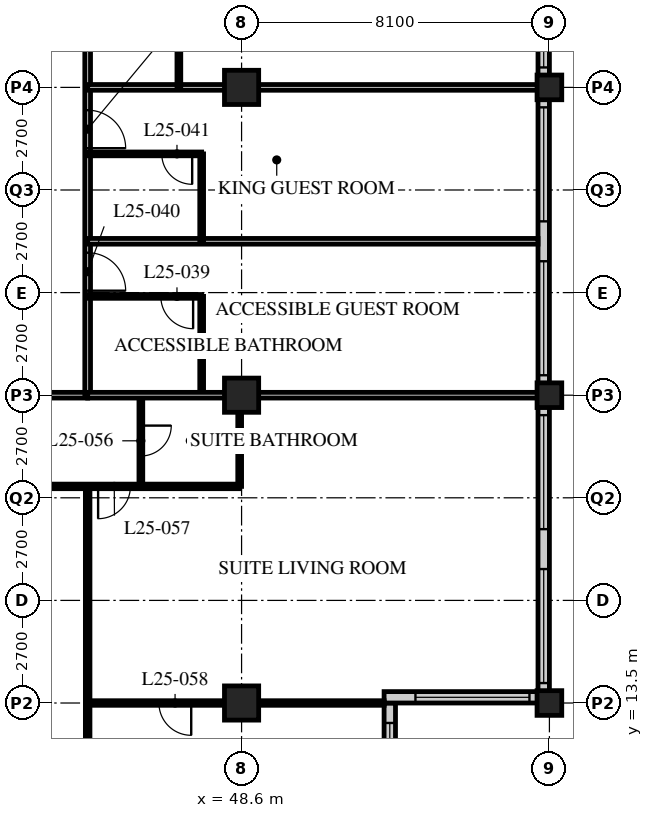
"""IFC4 building model, lengths in metres.
Left out: names, types, materials, properties, quantities, classifications, styles, units other than length and angle.
Written with IfcOpenShell. Run it as: python <this file> out.ifc"""

import sys

from ifc_helpers import new_model, si_unit, direction, frame, frame_2d, origin, origin_2d, place, context, subcontext, project, spatial, rectangle, hollow_rectangle, extrude, element, fill, save


model = new_model("IFC4")
c1 = context("Model", 3, precision=1e-05, world=origin(), true_north=direction((0.0, 1.0)))
c2 = subcontext(c1, "Body", "Model", "MODEL_VIEW")
j1 = project(units=[si_unit("LENGTHUNIT", "METRE"), si_unit("PLANEANGLEUNIT", "RADIAN")], contexts=[c1])
p1 = place(None, origin())
s1 = spatial("IfcSite", under=j1, at=p1, CompositionType="ELEMENT")
p2 = place(p1, origin())
s2 = spatial("IfcBuilding", under=s1, at=p2, CompositionType="ELEMENT")
p3 = place(p2, frame((0.0, 0.0, 103.4)))
s3 = spatial("IfcBuildingStorey", under=s2, at=p3, CompositionType="ELEMENT", Elevation=103.4)
for number, where, z_axis, x_axis in (
    (1, (48.6, 13.5, 0.0), (0.0, 0.0, 1.0), (1.0, 0.0, 0.0)),
    (2, (48.6, 21.6, 0.0), (0.0, 0.0, 1.0), (1.0, 0.0, 0.0)),
    (3, (48.6, 29.7, 0.0), (0.0, 0.0, 1.0), (1.0, 0.0, 0.0)),
):
    element("IfcColumn", number, at=place(p3, frame(where, z_axis=z_axis, x_axis=x_axis)), inside=s3, PredefinedType="COLUMN", context=c2, shape_type="SweptSolid", body=[
        extrude(hollow_rectangle(XDim=0.9, YDim=0.9, WallThickness=0.1, at=origin_2d()), origin(), (0.0, 0.0, 1.0), 3.4),
    ])
for number, where, z_axis, x_axis in (
    (4, (56.7, 13.5, 0.0), (0.0, 0.0, 1.0), (1.0, 0.0, 0.0)),
    (5, (56.7, 21.6, 0.0), (0.0, 0.0, 1.0), (1.0, 0.0, 0.0)),
    (6, (56.7, 29.7, 0.0), (0.0, 0.0, 1.0), (1.0, 0.0, 0.0)),
):
    element("IfcColumn", number, at=place(p3, frame(where, z_axis=z_axis, x_axis=x_axis)), inside=s3, PredefinedType="COLUMN", context=c2, shape_type="SweptSolid", body=[
        extrude(hollow_rectangle(XDim=0.65, YDim=0.65, WallThickness=0.055, at=origin_2d()), origin(), (0.0, 0.0, 1.0), 3.4),
    ])
p4 = place(p3, frame((52.5, 9.75, 0.0), z_axis=(0.0, 0.0, 1.0), x_axis=(0.0, 1.0, 0.0)))
e7 = element("IfcWall", 7, at=p4, inside=s3, PredefinedType="SOLIDWALL", context=c2, shape_type="SweptSolid", body=[
    extrude(rectangle(XDim=3.75, YDim=0.3, at=frame_2d((1.875, 0.0))), origin(), (0.0, 0.0, 1.0), 3.19),
])
p5 = place(p4, frame((0.225, 0.0, 0.9)))
e8 = element("IfcOpeningElement", 8, at=p5, cuts=e7, PredefinedType="OPENING", context=c2, shape_type="SweptSolid", body=[
    extrude(rectangle(XDim=3.0, YDim=1.5, at=frame_2d((1.5, 0.75))), frame((0.0, 0.16, 0.0), z_axis=(0.0, -1.0, 0.0), x_axis=(1.0, 0.0, 0.0)), (0.0, 0.0, 1.0), 0.32),
])
p6 = place(p3, frame((52.35, 13.65, 0.0), z_axis=(0.0, 0.0, 1.0), x_axis=(1.0, 0.0, 0.0)))
e9 = element("IfcWall", 9, at=p6, inside=s3, PredefinedType="SOLIDWALL", context=c2, shape_type="SweptSolid", body=[
    extrude(rectangle(XDim=4.35, YDim=0.3, at=frame_2d((2.175, 0.0))), origin(), (0.0, 0.0, 1.0), 3.19),
])
p7 = place(p6, frame((0.825, 0.0, 0.9)))
e10 = element("IfcOpeningElement", 10, at=p7, cuts=e9, PredefinedType="OPENING", context=c2, shape_type="SweptSolid", body=[
    extrude(rectangle(XDim=3.0, YDim=1.5, at=frame_2d((1.5, 0.75))), frame((0.0, 0.16, 0.0), z_axis=(0.0, -1.0, 0.0), x_axis=(1.0, 0.0, 0.0)), (0.0, 0.0, 1.0), 0.32),
])
p8 = place(p3, frame((56.55, 13.8, 0.0), z_axis=(0.0, 0.0, 1.0), x_axis=(0.0, 1.0, 0.0)))
e11 = element("IfcWall", 11, at=p8, inside=s3, PredefinedType="SOLIDWALL", context=c2, shape_type="SweptSolid", body=[
    extrude(rectangle(XDim=32.1, YDim=0.3, at=frame_2d((16.05, 0.0))), origin(), (0.0, 0.0, 1.0), 3.19),
])
p9 = place(p8, frame((0.225, 0.0, 0.9)))
e12 = element("IfcOpeningElement", 12, at=p9, cuts=e11, PredefinedType="OPENING", context=c2, shape_type="SweptSolid", body=[
    extrude(rectangle(XDim=3.0, YDim=2.0, at=frame_2d((1.5, 1.0))), frame((0.0, 0.16, 0.0), z_axis=(0.0, -1.0, 0.0), x_axis=(1.0, 0.0, 0.0)), (0.0, 0.0, 1.0), 0.32),
])
p10 = place(p8, frame((4.275, 0.0, 0.9)))
e13 = element("IfcOpeningElement", 13, at=p10, cuts=e11, PredefinedType="OPENING", context=c2, shape_type="SweptSolid", body=[
    extrude(rectangle(XDim=3.0, YDim=2.0, at=frame_2d((1.5, 1.0))), frame((0.0, 0.16, 0.0), z_axis=(0.0, -1.0, 0.0), x_axis=(1.0, 0.0, 0.0)), (0.0, 0.0, 1.0), 0.32),
])
p11 = place(p8, frame((8.325, 0.0, 0.9)))
e14 = element("IfcOpeningElement", 14, at=p11, cuts=e11, PredefinedType="OPENING", context=c2, shape_type="SweptSolid", body=[
    extrude(rectangle(XDim=3.0, YDim=2.0, at=frame_2d((1.5, 1.0))), frame((0.0, 0.16, 0.0), z_axis=(0.0, -1.0, 0.0), x_axis=(1.0, 0.0, 0.0)), (0.0, 0.0, 1.0), 0.32),
])
p12 = place(p8, frame((12.375, 0.0, 0.9)))
e15 = element("IfcOpeningElement", 15, at=p12, cuts=e11, PredefinedType="OPENING", context=c2, shape_type="SweptSolid", body=[
    extrude(rectangle(XDim=3.0, YDim=2.0, at=frame_2d((1.5, 1.0))), frame((0.0, 0.16, 0.0), z_axis=(0.0, -1.0, 0.0), x_axis=(1.0, 0.0, 0.0)), (0.0, 0.0, 1.0), 0.32),
])
p13 = place(p8, frame((16.425, 0.0, 0.9)))
e16 = element("IfcOpeningElement", 16, at=p13, cuts=e11, PredefinedType="OPENING", context=c2, shape_type="SweptSolid", body=[
    extrude(rectangle(XDim=3.0, YDim=2.0, at=frame_2d((1.5, 1.0))), frame((0.0, 0.16, 0.0), z_axis=(0.0, -1.0, 0.0), x_axis=(1.0, 0.0, 0.0)), (0.0, 0.0, 1.0), 0.32),
])
p14 = place(p8, frame((20.475, 0.0, 0.9)))
e17 = element("IfcOpeningElement", 17, at=p14, cuts=e11, PredefinedType="OPENING", context=c2, shape_type="SweptSolid", body=[
    extrude(rectangle(XDim=3.0, YDim=2.0, at=frame_2d((1.5, 1.0))), frame((0.0, 0.16, 0.0), z_axis=(0.0, -1.0, 0.0), x_axis=(1.0, 0.0, 0.0)), (0.0, 0.0, 1.0), 0.32),
])
p15 = place(p8, frame((24.525, 0.0, 0.9)))
e18 = element("IfcOpeningElement", 18, at=p15, cuts=e11, PredefinedType="OPENING", context=c2, shape_type="SweptSolid", body=[
    extrude(rectangle(XDim=3.0, YDim=2.0, at=frame_2d((1.5, 1.0))), frame((0.0, 0.16, 0.0), z_axis=(0.0, -1.0, 0.0), x_axis=(1.0, 0.0, 0.0)), (0.0, 0.0, 1.0), 0.32),
])
p16 = place(p8, frame((28.575, 0.0, 0.9)))
e19 = element("IfcOpeningElement", 19, at=p16, cuts=e11, PredefinedType="OPENING", context=c2, shape_type="SweptSolid", body=[
    extrude(rectangle(XDim=3.0, YDim=2.0, at=frame_2d((1.5, 1.0))), frame((0.0, 0.16, 0.0), z_axis=(0.0, -1.0, 0.0), x_axis=(1.0, 0.0, 0.0)), (0.0, 0.0, 1.0), 0.32),
])
p17 = place(p3, frame((12.15, 21.6, 0.0), z_axis=(0.0, 0.0, 1.0), x_axis=(1.0, 0.0, 0.0)))
e20 = element("IfcWall", 20, at=p17, inside=s3, PredefinedType="PARTITIONING", context=c2, shape_type="SweptSolid", body=[
    extrude(rectangle(XDim=32.4, YDim=0.15, at=frame_2d((16.2, 0.0))), origin(), (0.0, 0.0, 1.0), 2.578),
])
p18 = place(p17, frame((5.95, 0.0, 0.0)))
e21 = element("IfcOpeningElement", 21, at=p18, cuts=e20, PredefinedType="OPENING", context=c2, shape_type="SweptSolid", body=[
    extrude(rectangle(XDim=1.0, YDim=2.1, at=frame_2d((0.5, 1.05))), frame((0.0, 0.085, 0.0), z_axis=(0.0, -1.0, 0.0), x_axis=(1.0, 0.0, 0.0)), (0.0, 0.0, 1.0), 0.17),
])
p19 = place(p17, frame((14.05, 0.0, 0.0)))
e22 = element("IfcOpeningElement", 22, at=p19, cuts=e20, PredefinedType="OPENING", context=c2, shape_type="SweptSolid", body=[
    extrude(rectangle(XDim=1.0, YDim=2.1, at=frame_2d((0.5, 1.05))), frame((0.0, 0.085, 0.0), z_axis=(0.0, -1.0, 0.0), x_axis=(1.0, 0.0, 0.0)), (0.0, 0.0, 1.0), 0.17),
])
p20 = place(p17, frame((22.15, 0.0, 0.0)))
e23 = element("IfcOpeningElement", 23, at=p20, cuts=e20, PredefinedType="OPENING", context=c2, shape_type="SweptSolid", body=[
    extrude(rectangle(XDim=1.0, YDim=2.1, at=frame_2d((0.5, 1.05))), frame((0.0, 0.085, 0.0), z_axis=(0.0, -1.0, 0.0), x_axis=(1.0, 0.0, 0.0)), (0.0, 0.0, 1.0), 0.17),
])
p21 = place(p17, frame((1.525, 0.0, 0.0)))
e24 = element("IfcOpeningElement", 24, at=p21, cuts=e20, PredefinedType="OPENING", context=c2, shape_type="SweptSolid", body=[
    extrude(rectangle(XDim=1.0, YDim=2.1, at=frame_2d((0.5, 1.05))), frame((0.0, 0.085, 0.0), z_axis=(0.0, -1.0, 0.0), x_axis=(1.0, 0.0, 0.0)), (0.0, 0.0, 1.0), 0.17),
])
p22 = place(p17, frame((29.875, 0.0, 0.0)))
e25 = element("IfcOpeningElement", 25, at=p22, cuts=e20, PredefinedType="OPENING", context=c2, shape_type="SweptSolid", body=[
    extrude(rectangle(XDim=1.0, YDim=2.1, at=frame_2d((0.5, 1.05))), frame((0.0, 0.085, 0.0), z_axis=(0.0, -1.0, 0.0), x_axis=(1.0, 0.0, 0.0)), (0.0, 0.0, 1.0), 0.17),
])
p23 = place(p3, frame((44.55, 21.6, 0.0), z_axis=(0.0, 0.0, 1.0), x_axis=(0.0, 1.0, 0.0)))
e26 = element("IfcWall", 26, at=p23, inside=s3, PredefinedType="PARTITIONING", context=c2, shape_type="SweptSolid", body=[
    extrude(rectangle(XDim=24.3, YDim=0.15, at=frame_2d((12.15, 0.0))), origin(), (0.0, 0.0, 1.0), 3.19),
])
p24 = place(p23, frame((2.75, 0.0, 0.0)))
e27 = element("IfcOpeningElement", 27, at=p24, cuts=e26, PredefinedType="OPENING", context=c2, shape_type="SweptSolid", body=[
    extrude(rectangle(XDim=1.0, YDim=2.1, at=frame_2d((0.5, 1.05))), frame((0.0, 0.085, 0.0), z_axis=(0.0, -1.0, 0.0), x_axis=(1.0, 0.0, 0.0)), (0.0, 0.0, 1.0), 0.17),
])
p25 = place(p23, frame((6.5, 0.0, 0.0)))
e28 = element("IfcOpeningElement", 28, at=p25, cuts=e26, PredefinedType="OPENING", context=c2, shape_type="SweptSolid", body=[
    extrude(rectangle(XDim=1.0, YDim=2.1, at=frame_2d((0.5, 1.05))), frame((0.0, 0.085, 0.0), z_axis=(0.0, -1.0, 0.0), x_axis=(1.0, 0.0, 0.0)), (0.0, 0.0, 1.0), 0.17),
])
p26 = place(p23, frame((13.55, 0.0, 0.0)))
e29 = element("IfcOpeningElement", 29, at=p26, cuts=e26, PredefinedType="OPENING", context=c2, shape_type="SweptSolid", body=[
    extrude(rectangle(XDim=1.0, YDim=2.1, at=frame_2d((0.5, 1.05))), frame((0.0, 0.085, 0.0), z_axis=(0.0, -1.0, 0.0), x_axis=(1.0, 0.0, 0.0)), (0.0, 0.0, 1.0), 0.17),
])
p27 = place(p23, frame((21.65, 0.0, 0.0)))
e30 = element("IfcOpeningElement", 30, at=p27, cuts=e26, PredefinedType="OPENING", context=c2, shape_type="SweptSolid", body=[
    extrude(rectangle(XDim=1.0, YDim=2.1, at=frame_2d((0.5, 1.05))), frame((0.0, 0.085, 0.0), z_axis=(0.0, -1.0, 0.0), x_axis=(1.0, 0.0, 0.0)), (0.0, 0.0, 1.0), 0.17),
])
p28 = place(p3, frame((47.55, 21.6, 0.0), z_axis=(0.0, 0.0, 1.0), x_axis=(0.0, 1.0, 0.0)))
e31 = element("IfcWall", 31, at=p28, inside=s3, PredefinedType="PARTITIONING", context=c2, shape_type="SweptSolid", body=[
    extrude(rectangle(XDim=2.6, YDim=0.1, at=frame_2d((1.3, 0.0))), origin(), (0.0, 0.0, 1.0), 3.19),
])
p29 = place(p3, frame((44.55, 24.2, 0.0), z_axis=(0.0, 0.0, 1.0), x_axis=(1.0, 0.0, 0.0)))
e32 = element("IfcWall", 32, at=p29, inside=s3, PredefinedType="PARTITIONING", context=c2, shape_type="SweptSolid", body=[
    extrude(rectangle(XDim=3.0, YDim=0.1, at=frame_2d((1.5, 0.0))), origin(), (0.0, 0.0, 1.0), 3.19),
])
p30 = place(p29, frame((1.925, 0.0, 0.0)))
e33 = element("IfcOpeningElement", 33, at=p30, cuts=e32, PredefinedType="OPENING", context=c2, shape_type="SweptSolid", body=[
    extrude(rectangle(XDim=0.85, YDim=2.1, at=frame_2d((0.425, 1.05))), frame((0.0, 0.06, 0.0), z_axis=(0.0, -1.0, 0.0), x_axis=(1.0, 0.0, 0.0)), (0.0, 0.0, 1.0), 0.12),
])
p31 = place(p3, frame((44.55, 25.65, 0.0), z_axis=(0.0, 0.0, 1.0), x_axis=(1.0, 0.0, 0.0)))
e34 = element("IfcWall", 34, at=p31, inside=s3, PredefinedType="PARTITIONING", context=c2, shape_type="SweptSolid", body=[
    extrude(rectangle(XDim=11.85, YDim=0.15, at=frame_2d((5.925, 0.0))), origin(), (0.0, 0.0, 1.0), 3.19),
])
p32 = place(p3, frame((47.55, 25.65, 0.0), z_axis=(0.0, 0.0, 1.0), x_axis=(0.0, 1.0, 0.0)))
e35 = element("IfcWall", 35, at=p32, inside=s3, PredefinedType="PARTITIONING", context=c2, shape_type="SweptSolid", body=[
    extrude(rectangle(XDim=2.3, YDim=0.1, at=frame_2d((1.15, 0.0))), origin(), (0.0, 0.0, 1.0), 3.19),
])
p33 = place(p3, frame((44.55, 27.95, 0.0), z_axis=(0.0, 0.0, 1.0), x_axis=(1.0, 0.0, 0.0)))
e36 = element("IfcWall", 36, at=p33, inside=s3, PredefinedType="PARTITIONING", context=c2, shape_type="SweptSolid", body=[
    extrude(rectangle(XDim=3.0, YDim=0.1, at=frame_2d((1.5, 0.0))), origin(), (0.0, 0.0, 1.0), 3.19),
])
p34 = place(p33, frame((1.95, 0.0, 0.0)))
e37 = element("IfcOpeningElement", 37, at=p34, cuts=e36, PredefinedType="OPENING", context=c2, shape_type="SweptSolid", body=[
    extrude(rectangle(XDim=0.8, YDim=2.1, at=frame_2d((0.4, 1.05))), frame((0.0, 0.06, 0.0), z_axis=(0.0, -1.0, 0.0), x_axis=(1.0, 0.0, 0.0)), (0.0, 0.0, 1.0), 0.12),
])
p35 = place(p3, frame((44.55, 29.7, 0.0), z_axis=(0.0, 0.0, 1.0), x_axis=(1.0, 0.0, 0.0)))
e38 = element("IfcWall", 38, at=p35, inside=s3, PredefinedType="PARTITIONING", context=c2, shape_type="SweptSolid", body=[
    extrude(rectangle(XDim=11.85, YDim=0.15, at=frame_2d((5.925, 0.0))), origin(), (0.0, 0.0, 1.0), 2.578),
])
p36 = place(p3, frame((46.95, 29.7, 0.0), z_axis=(0.0, 0.0, 1.0), x_axis=(0.0, 1.0, 0.0)))
e39 = element("IfcWall", 39, at=p36, inside=s3, PredefinedType="PARTITIONING", context=c2, shape_type="SweptSolid", body=[
    extrude(rectangle(XDim=5.2, YDim=0.1, at=frame_2d((2.6, 0.0))), origin(), (0.0, 0.0, 1.0), 3.19),
])
p37 = place(p36, frame((1.3, 0.0, 0.0)))
e40 = element("IfcOpeningElement", 40, at=p37, cuts=e39, PredefinedType="OPENING", context=c2, shape_type="SweptSolid", body=[
    extrude(rectangle(XDim=0.8, YDim=2.1, at=frame_2d((0.4, 1.05))), frame((0.0, 0.06, 0.0), z_axis=(0.0, -1.0, 0.0), x_axis=(1.0, 0.0, 0.0)), (0.0, 0.0, 1.0), 0.12),
])
p38 = place(p36, frame((3.9, 0.0, 0.0)))
e41 = element("IfcOpeningElement", 41, at=p38, cuts=e39, PredefinedType="OPENING", context=c2, shape_type="SweptSolid", body=[
    extrude(rectangle(XDim=0.8, YDim=2.1, at=frame_2d((0.4, 1.05))), frame((0.0, 0.06, 0.0), z_axis=(0.0, -1.0, 0.0), x_axis=(1.0, 0.0, 0.0)), (0.0, 0.0, 1.0), 0.12),
])
p39 = place(p3, frame((40.5, 19.2, 0.0), z_axis=(0.0, 0.0, 1.0), x_axis=(1.0, 0.0, 0.0)))
e42 = element("IfcWall", 42, at=p39, inside=s3, PredefinedType="PARTITIONING", context=c2, shape_type="SweptSolid", body=[
    extrude(rectangle(XDim=8.05, YDim=0.12, at=frame_2d((4.025, 0.0))), origin(), (0.0, 0.0, 1.0), 3.19),
])
p40 = place(p39, frame((0.475, 0.0, 0.0)))
e43 = element("IfcOpeningElement", 43, at=p40, cuts=e42, PredefinedType="OPENING", context=c2, shape_type="SweptSolid", body=[
    extrude(rectangle(XDim=0.85, YDim=2.1, at=frame_2d((0.425, 1.05))), frame((0.0, 0.07, 0.0), z_axis=(0.0, -1.0, 0.0), x_axis=(1.0, 0.0, 0.0)), (0.0, 0.0, 1.0), 0.14),
])
p41 = place(p39, frame((4.325, 0.0, 0.0)))
e44 = element("IfcOpeningElement", 44, at=p41, cuts=e42, PredefinedType="OPENING", context=c2, shape_type="SweptSolid", body=[
    extrude(rectangle(XDim=0.85, YDim=2.1, at=frame_2d((0.425, 1.05))), frame((0.0, 0.07, 0.0), z_axis=(0.0, -1.0, 0.0), x_axis=(1.0, 0.0, 0.0)), (0.0, 0.0, 1.0), 0.14),
])
p42 = place(p3, frame((45.95, 21.6, 0.0), z_axis=(0.0, 0.0, 1.0), x_axis=(0.0, -1.0, 0.0)))
e45 = element("IfcWall", 45, at=p42, inside=s3, PredefinedType="PARTITIONING", context=c2, shape_type="SweptSolid", body=[
    extrude(rectangle(XDim=2.4, YDim=0.1, at=frame_2d((1.2, 0.0))), origin(), (0.0, 0.0, 1.0), 3.19),
])
p43 = place(p42, frame((0.8, 0.0, 0.0)))
e46 = element("IfcOpeningElement", 46, at=p43, cuts=e45, PredefinedType="OPENING", context=c2, shape_type="SweptSolid", body=[
    extrude(rectangle(XDim=0.8, YDim=2.1, at=frame_2d((0.4, 1.05))), frame((0.0, 0.06, 0.0), z_axis=(0.0, -1.0, 0.0), x_axis=(1.0, 0.0, 0.0)), (0.0, 0.0, 1.0), 0.12),
])
p44 = place(p3, frame((48.55, 21.6, 0.0), z_axis=(0.0, 0.0, 1.0), x_axis=(0.0, -1.0, 0.0)))
e47 = element("IfcWall", 47, at=p44, inside=s3, PredefinedType="PARTITIONING", context=c2, shape_type="SweptSolid", body=[
    extrude(rectangle(XDim=2.4, YDim=0.1, at=frame_2d((1.2, 0.0))), origin(), (0.0, 0.0, 1.0), 2.578),
])
p45 = place(p3, frame((44.55, 19.2, 0.0), z_axis=(0.0, 0.0, 1.0), x_axis=(0.0, -1.0, 0.0)))
e48 = element("IfcWall", 48, at=p45, inside=s3, PredefinedType="PARTITIONING", context=c2, shape_type="SweptSolid", body=[
    extrude(rectangle(XDim=13.5, YDim=0.12, at=frame_2d((6.75, 0.0))), origin(), (0.0, 0.0, 1.0), 3.19),
])
p46 = place(p3, frame((44.55, 13.5, 0.0), z_axis=(0.0, 0.0, 1.0), x_axis=(1.0, 0.0, 0.0)))
e49 = element("IfcWall", 49, at=p46, inside=s3, PredefinedType="PARTITIONING", context=c2, shape_type="SweptSolid", body=[
    extrude(rectangle(XDim=7.8, YDim=0.12, at=frame_2d((3.9, 0.0))), origin(), (0.0, 0.0, 1.0), 2.578),
])
p47 = place(p46, frame((1.875, 0.0, 0.0)))
e50 = element("IfcOpeningElement", 50, at=p47, cuts=e49, PredefinedType="OPENING", context=c2, shape_type="SweptSolid", body=[
    extrude(rectangle(XDim=0.85, YDim=2.1, at=frame_2d((0.425, 1.05))), frame((0.0, 0.07, 0.0), z_axis=(0.0, -1.0, 0.0), x_axis=(1.0, 0.0, 0.0)), (0.0, 0.0, 1.0), 0.14),
])
p48 = place(p3, frame((44.55, 21.6, 0.0), z_axis=(0.0, 0.0, 1.0), x_axis=(1.0, 0.0, 0.0)))
e51 = element("IfcWall", 51, at=p48, inside=s3, PredefinedType="PARTITIONING", context=c2, shape_type="SweptSolid", body=[
    extrude(rectangle(XDim=11.85, YDim=0.15, at=frame_2d((5.925, 0.0))), origin(), (0.0, 0.0, 1.0), 2.578),
])
p49 = place(p5, origin())
e52 = element("IfcWindow", 52, at=p49, inside=s3, PartitioningType="SINGLE_PANEL", PredefinedType="WINDOW", context=c2, shape_type="SweptSolid", body=[
    extrude(rectangle(XDim=3.0, YDim=1.5, at=frame_2d((1.5, 0.75))), frame((0.0, 0.03, 0.0), z_axis=(0.0, -1.0, 0.0), x_axis=(1.0, 0.0, 0.0)), (0.0, 0.0, 1.0), 0.06),
])
fill(e8, e52)
p50 = place(p7, origin())
e53 = element("IfcWindow", 53, at=p50, inside=s3, PartitioningType="SINGLE_PANEL", PredefinedType="WINDOW", context=c2, shape_type="SweptSolid", body=[
    extrude(rectangle(XDim=3.0, YDim=1.5, at=frame_2d((1.5, 0.75))), frame((0.0, 0.03, 0.0), z_axis=(0.0, -1.0, 0.0), x_axis=(1.0, 0.0, 0.0)), (0.0, 0.0, 1.0), 0.06),
])
fill(e10, e53)
p51 = place(p9, origin())
e54 = element("IfcWindow", 54, at=p51, inside=s3, PartitioningType="SINGLE_PANEL", PredefinedType="WINDOW", context=c2, shape_type="SweptSolid", body=[
    extrude(rectangle(XDim=3.0, YDim=2.0, at=frame_2d((1.5, 1.0))), frame((0.0, 0.03, 0.0), z_axis=(0.0, -1.0, 0.0), x_axis=(1.0, 0.0, 0.0)), (0.0, 0.0, 1.0), 0.06),
])
fill(e12, e54)
p52 = place(p10, origin())
e55 = element("IfcWindow", 55, at=p52, inside=s3, PartitioningType="SINGLE_PANEL", PredefinedType="WINDOW", context=c2, shape_type="SweptSolid", body=[
    extrude(rectangle(XDim=3.0, YDim=2.0, at=frame_2d((1.5, 1.0))), frame((0.0, 0.03, 0.0), z_axis=(0.0, -1.0, 0.0), x_axis=(1.0, 0.0, 0.0)), (0.0, 0.0, 1.0), 0.06),
])
fill(e13, e55)
p53 = place(p11, origin())
e56 = element("IfcWindow", 56, at=p53, inside=s3, PartitioningType="SINGLE_PANEL", PredefinedType="WINDOW", context=c2, shape_type="SweptSolid", body=[
    extrude(rectangle(XDim=3.0, YDim=2.0, at=frame_2d((1.5, 1.0))), frame((0.0, 0.03, 0.0), z_axis=(0.0, -1.0, 0.0), x_axis=(1.0, 0.0, 0.0)), (0.0, 0.0, 1.0), 0.06),
])
fill(e14, e56)
p54 = place(p12, origin())
e57 = element("IfcWindow", 57, at=p54, inside=s3, PartitioningType="SINGLE_PANEL", PredefinedType="WINDOW", context=c2, shape_type="SweptSolid", body=[
    extrude(rectangle(XDim=3.0, YDim=2.0, at=frame_2d((1.5, 1.0))), frame((0.0, 0.03, 0.0), z_axis=(0.0, -1.0, 0.0), x_axis=(1.0, 0.0, 0.0)), (0.0, 0.0, 1.0), 0.06),
])
fill(e15, e57)
p55 = place(p13, origin())
e58 = element("IfcWindow", 58, at=p55, inside=s3, PartitioningType="SINGLE_PANEL", PredefinedType="WINDOW", context=c2, shape_type="SweptSolid", body=[
    extrude(rectangle(XDim=3.0, YDim=2.0, at=frame_2d((1.5, 1.0))), frame((0.0, 0.03, 0.0), z_axis=(0.0, -1.0, 0.0), x_axis=(1.0, 0.0, 0.0)), (0.0, 0.0, 1.0), 0.06),
])
fill(e16, e58)
p56 = place(p30, origin())
e59 = element("IfcDoor", 59, at=p56, inside=s3, OperationType="SINGLE_SWING_LEFT", PredefinedType="DOOR", context=c2, shape_type="SweptSolid", body=[
    extrude(rectangle(XDim=0.85, YDim=2.1, at=frame_2d((0.425, 1.05))), frame((0.0, 0.025, 0.0), z_axis=(0.0, -1.0, 0.0), x_axis=(1.0, 0.0, 0.0)), (0.0, 0.0, 1.0), 0.05),
])
fill(e33, e59)
p57 = place(p24, origin())
e60 = element("IfcDoor", 60, at=p57, inside=s3, OperationType="SINGLE_SWING_RIGHT", PredefinedType="DOOR", context=c2, shape_type="SweptSolid", body=[
    extrude(rectangle(XDim=1.0, YDim=2.1, at=frame_2d((0.5, 1.05))), frame((0.0, 0.025, 0.0), z_axis=(0.0, -1.0, 0.0), x_axis=(1.0, 0.0, 0.0)), (0.0, 0.0, 1.0), 0.05),
])
fill(e27, e60)
p58 = place(p34, origin())
e61 = element("IfcDoor", 61, at=p58, inside=s3, OperationType="SINGLE_SWING_LEFT", PredefinedType="DOOR", context=c2, shape_type="SweptSolid", body=[
    extrude(rectangle(XDim=0.8, YDim=2.1, at=frame_2d((0.4, 1.05))), frame((0.0, 0.025, 0.0), z_axis=(0.0, -1.0, 0.0), x_axis=(1.0, 0.0, 0.0)), (0.0, 0.0, 1.0), 0.05),
])
fill(e37, e61)
p59 = place(p25, origin())
e62 = element("IfcDoor", 62, at=p59, inside=s3, OperationType="SINGLE_SWING_RIGHT", PredefinedType="DOOR", context=c2, shape_type="SweptSolid", body=[
    extrude(rectangle(XDim=1.0, YDim=2.1, at=frame_2d((0.5, 1.05))), frame((0.0, 0.025, 0.0), z_axis=(0.0, -1.0, 0.0), x_axis=(1.0, 0.0, 0.0)), (0.0, 0.0, 1.0), 0.05),
])
fill(e28, e62)
p60 = place(p43, origin())
e63 = element("IfcDoor", 63, at=p60, inside=s3, OperationType="SINGLE_SWING_LEFT", PredefinedType="DOOR", context=c2, shape_type="SweptSolid", body=[
    extrude(rectangle(XDim=0.8, YDim=2.1, at=frame_2d((0.4, 1.05))), frame((0.0, 0.025, 0.0), z_axis=(0.0, -1.0, 0.0), x_axis=(1.0, 0.0, 0.0)), (0.0, 0.0, 1.0), 0.05),
])
fill(e46, e63)
p61 = place(p41, origin())
e64 = element("IfcDoor", 64, at=p61, inside=s3, OperationType="SINGLE_SWING_RIGHT", PredefinedType="DOOR", context=c2, shape_type="SweptSolid", body=[
    extrude(rectangle(XDim=0.85, YDim=2.1, at=frame_2d((0.425, 1.05))), frame((0.0, 0.025, 0.0), z_axis=(0.0, -1.0, 0.0), x_axis=(1.0, 0.0, 0.0)), (0.0, 0.0, 1.0), 0.05),
])
fill(e44, e64)
p62 = place(p47, origin())
e65 = element("IfcDoor", 65, at=p62, inside=s3, OperationType="SINGLE_SWING_LEFT", PredefinedType="DOOR", context=c2, shape_type="SweptSolid", body=[
    extrude(rectangle(XDim=0.85, YDim=2.1, at=frame_2d((0.425, 1.05))), frame((0.0, 0.025, 0.0), z_axis=(0.0, -1.0, 0.0), x_axis=(1.0, 0.0, 0.0)), (0.0, 0.0, 1.0), 0.05),
])
fill(e50, e65)
save(model, sys.argv[1])
